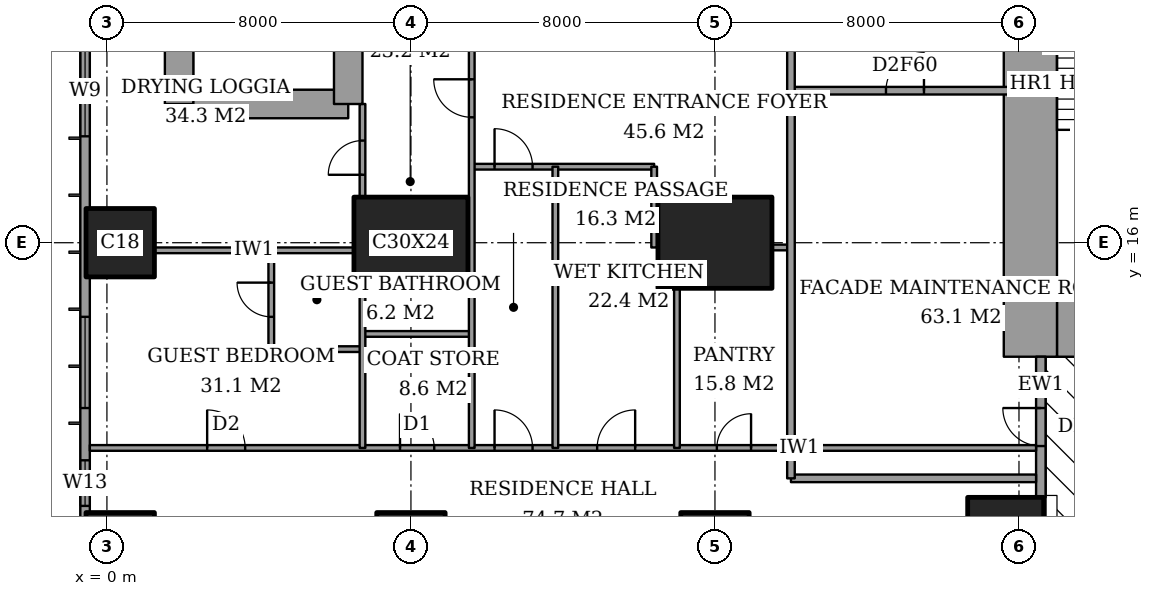
"""IFC4 building model, lengths in metres.
Left out: names, types, materials, properties, quantities, classifications, styles, units other than length and angle.
Written with IfcOpenShell. Run it as: python <this file> out.ifc"""

import sys

from ifc_helpers import new_model, si_unit, direction, frame, frame_2d, origin, origin_2d, place, context, subcontext, project, spatial, rectangle, extrude, element, fill, save


model = new_model("IFC4")
c1 = context("Model", 3, precision=1e-05, world=origin(), true_north=direction((0.0, 1.0)))
c2 = subcontext(c1, "Body", "Model", "MODEL_VIEW")
j1 = project(units=[si_unit("LENGTHUNIT", "METRE"), si_unit("PLANEANGLEUNIT", "RADIAN")], contexts=[c1])
p1 = place(None, origin())
s1 = spatial("IfcSite", under=j1, at=p1, CompositionType="ELEMENT")
p2 = place(p1, origin())
s2 = spatial("IfcBuilding", under=s1, at=p2, CompositionType="ELEMENT")
p3 = place(p2, frame((0.0, 0.0, 182.2)))
s3 = spatial("IfcBuildingStorey", under=s2, at=p3, CompositionType="ELEMENT", Elevation=182.2)
for number, where, z_axis, x_axis in (
    (1, (0.35, 8.0, 0.0), (0.0, 0.0, 1.0), (1.0, 0.0, 0.0)),
    (2, (0.35, 16.0, 0.0), (0.0, 0.0, 1.0), (1.0, 0.0, 0.0)),
    (3, (8.0, 8.0, 0.0), (0.0, 0.0, 1.0), (1.0, 0.0, 0.0)),
):
    element("IfcColumn", number, at=place(p3, frame(where, z_axis=z_axis, x_axis=x_axis)), inside=s3, PredefinedType="COLUMN", context=c2, shape_type="SweptSolid", body=[
        extrude(rectangle(XDim=1.8, YDim=1.8, at=origin_2d()), origin(), (0.0, 0.0, 1.0), 3.6),
    ])
p4 = place(p3, frame((8.0, 16.0, 0.0), z_axis=(0.0, 0.0, 1.0), x_axis=(1.0, 0.0, 0.0)))
e4 = element("IfcColumn", 4, at=p4, inside=s3, PredefinedType="COLUMN", context=c2, shape_type="SweptSolid", body=[
    extrude(rectangle(XDim=3.0, YDim=2.4, at=origin_2d()), origin(), (0.0, 0.0, 1.0), 3.6),
])
p5 = place(p3, frame((16.0, 8.0, 0.0), z_axis=(0.0, 0.0, 1.0), x_axis=(1.0, 0.0, 0.0)))
e5 = element("IfcColumn", 5, at=p5, inside=s3, PredefinedType="COLUMN", context=c2, shape_type="SweptSolid", body=[
    extrude(rectangle(XDim=1.8, YDim=1.8, at=origin_2d()), origin(), (0.0, 0.0, 1.0), 3.6),
])
p6 = place(p3, frame((16.0, 16.0, 0.0), z_axis=(0.0, 0.0, 1.0), x_axis=(1.0, 0.0, 0.0)))
e6 = element("IfcColumn", 6, at=p6, inside=s3, PredefinedType="COLUMN", context=c2, shape_type="SweptSolid", body=[
    extrude(rectangle(XDim=3.0, YDim=2.4, at=origin_2d()), origin(), (0.0, 0.0, 1.0), 3.6),
])
p7 = place(p3, frame((23.65, 8.0, 0.0), z_axis=(0.0, 0.0, 1.0), x_axis=(1.0, 0.0, 0.0)))
e7 = element("IfcColumn", 7, at=p7, inside=s3, PredefinedType="COLUMN", context=c2, shape_type="SweptSolid", body=[
    extrude(rectangle(XDim=2.0, YDim=2.6, at=origin_2d()), origin(), (0.0, 0.0, 1.0), 3.6),
])
p8 = place(p3, frame((25.0, 14.0, 0.0), z_axis=(0.0, 0.0, 1.0), x_axis=(1.0, 0.0, 0.0)))
e8 = element("IfcWall", 8, at=p8, inside=s3, PredefinedType="SHEAR", context=c2, shape_type="SweptSolid", body=[
    extrude(rectangle(XDim=3.15, YDim=2.0, at=frame_2d((1.575, 0.0))), origin(), (0.0, 0.0, 1.0), 3.6),
])
p9 = place(p3, frame((24.3, 13.0, 0.0), z_axis=(0.0, 0.0, 1.0), x_axis=(0.0, 1.0, 0.0)))
e9 = element("IfcWall", 9, at=p9, inside=s3, PredefinedType="SHEAR", context=c2, shape_type="SweptSolid", body=[
    extrude(rectangle(XDim=10.15, YDim=1.4, at=frame_2d((5.075, 0.0))), origin(), (0.0, 0.0, 1.0), 3.6),
])
p10 = place(p3, frame((1.9, 19.65, 0.0), z_axis=(0.0, 0.0, 1.0), x_axis=(1.0, 0.0, 0.0)))
e10 = element("IfcWall", 10, at=p10, inside=s3, PredefinedType="SHEAR", context=c2, shape_type="SweptSolid", body=[
    extrude(rectangle(XDim=4.45, YDim=0.75, at=frame_2d((2.225, 0.0))), origin(), (0.0, 0.0, 1.0), 3.6),
])
p11 = place(p3, frame((6.35, 19.65, 0.0), z_axis=(0.0, 0.0, 1.0), x_axis=(0.0, 1.0, 0.0)))
e11 = element("IfcWall", 11, at=p11, inside=s3, PredefinedType="SHEAR", context=c2, shape_type="SweptSolid", body=[
    extrude(rectangle(XDim=8.7, YDim=0.75, at=frame_2d((4.35, 0.0))), origin(), (0.0, 0.0, 1.0), 3.6),
])
p12 = place(p11, frame((6.725, 0.0, 0.0)))
e12 = element("IfcOpeningElement", 12, at=p12, cuts=e11, PredefinedType="OPENING", context=c2, shape_type="SweptSolid", body=[
    extrude(rectangle(XDim=1.0, YDim=2.1, at=frame_2d((0.5, 1.05))), frame((0.0, 0.385, 0.0), z_axis=(0.0, -1.0, 0.0), x_axis=(1.0, 0.0, 0.0)), (0.0, 0.0, 1.0), 0.77),
])
p13 = place(p3, frame((1.9, 28.35, 0.0), z_axis=(0.0, 0.0, 1.0), x_axis=(0.0, -1.0, 0.0)))
e13 = element("IfcWall", 13, at=p13, inside=s3, PredefinedType="SHEAR", context=c2, shape_type="SweptSolid", body=[
    extrude(rectangle(XDim=8.7, YDim=0.75, at=frame_2d((4.35, 0.0))), origin(), (0.0, 0.0, 1.0), 3.6),
])
p14 = place(p3, frame((24.575, 9.3, 0.0), z_axis=(0.0, 0.0, 1.0), x_axis=(0.0, 1.0, 0.0)))
e14 = element("IfcWall", 14, at=p14, inside=s3, PredefinedType="SOLIDWALL", context=c2, shape_type="SweptSolid", body=[
    extrude(rectangle(XDim=3.7, YDim=0.25, at=frame_2d((1.85, 0.0))), origin(), (0.0, 0.0, 1.0), 3.6),
])
p15 = place(p14, frame((1.35, 0.0, 0.0)))
e15 = element("IfcOpeningElement", 15, at=p15, cuts=e14, PredefinedType="OPENING", context=c2, shape_type="SweptSolid", body=[
    extrude(rectangle(XDim=1.0, YDim=2.1, at=frame_2d((0.5, 1.05))), frame((0.0, 0.135, 0.0), z_axis=(0.0, -1.0, 0.0), x_axis=(1.0, 0.0, 0.0)), (0.0, 0.0, 1.0), 0.27),
])
p16 = place(p3, frame((-0.575, 44.825, 0.0), z_axis=(0.0, 0.0, 1.0), x_axis=(0.0, -1.0, 0.0)))
e16 = element("IfcWall", 16, at=p16, inside=s3, PredefinedType="SOLIDWALL", context=c2, shape_type="SweptSolid", body=[
    extrude(rectangle(XDim=41.65, YDim=0.25, at=frame_2d((20.825, 0.0))), origin(), (0.0, 0.0, 1.0), 3.6),
])
p17 = place(p16, frame((0.825, 0.0, 0.2)))
e17 = element("IfcOpeningElement", 17, at=p17, cuts=e16, PredefinedType="OPENING", context=c2, shape_type="SweptSolid", body=[
    extrude(rectangle(XDim=2.4, YDim=2.4, at=frame_2d((1.2, 1.2))), frame((0.0, 0.135, 0.0), z_axis=(0.0, -1.0, 0.0), x_axis=(1.0, 0.0, 0.0)), (0.0, 0.0, 1.0), 0.27),
])
p18 = place(p16, frame((6.05, 0.0, 0.2)))
e18 = element("IfcOpeningElement", 18, at=p18, cuts=e16, PredefinedType="OPENING", context=c2, shape_type="SweptSolid", body=[
    extrude(rectangle(XDim=1.2, YDim=2.4, at=frame_2d((0.6, 1.2))), frame((0.0, 0.135, 0.0), z_axis=(0.0, -1.0, 0.0), x_axis=(1.0, 0.0, 0.0)), (0.0, 0.0, 1.0), 0.27),
])
p19 = place(p16, frame((8.475, 0.0, 0.2)))
e19 = element("IfcOpeningElement", 19, at=p19, cuts=e16, PredefinedType="OPENING", context=c2, shape_type="SweptSolid", body=[
    extrude(rectangle(XDim=2.4, YDim=2.4, at=frame_2d((1.2, 1.2))), frame((0.0, 0.135, 0.0), z_axis=(0.0, -1.0, 0.0), x_axis=(1.0, 0.0, 0.0)), (0.0, 0.0, 1.0), 0.27),
])
p20 = place(p16, frame((15.625, 0.0, 0.2)))
e20 = element("IfcOpeningElement", 20, at=p20, cuts=e16, PredefinedType="OPENING", context=c2, shape_type="SweptSolid", body=[
    extrude(rectangle(XDim=2.4, YDim=2.4, at=frame_2d((1.2, 1.2))), frame((0.0, 0.135, 0.0), z_axis=(0.0, -1.0, 0.0), x_axis=(1.0, 0.0, 0.0)), (0.0, 0.0, 1.0), 0.27),
])
p21 = place(p16, frame((23.625, 0.0, 0.2)))
e21 = element("IfcOpeningElement", 21, at=p21, cuts=e16, PredefinedType="OPENING", context=c2, shape_type="SweptSolid", body=[
    extrude(rectangle(XDim=2.4, YDim=2.4, at=frame_2d((1.2, 1.2))), frame((0.0, 0.135, 0.0), z_axis=(0.0, -1.0, 0.0), x_axis=(1.0, 0.0, 0.0)), (0.0, 0.0, 1.0), 0.27),
])
p22 = place(p16, frame((30.775, 0.0, 0.2)))
e22 = element("IfcOpeningElement", 22, at=p22, cuts=e16, PredefinedType="OPENING", context=c2, shape_type="SweptSolid", body=[
    extrude(rectangle(XDim=2.4, YDim=2.4, at=frame_2d((1.2, 1.2))), frame((0.0, 0.135, 0.0), z_axis=(0.0, -1.0, 0.0), x_axis=(1.0, 0.0, 0.0)), (0.0, 0.0, 1.0), 0.27),
])
p23 = place(p16, frame((34.55, 0.0, 0.2)))
e23 = element("IfcOpeningElement", 23, at=p23, cuts=e16, PredefinedType="OPENING", context=c2, shape_type="SweptSolid", body=[
    extrude(rectangle(XDim=1.2, YDim=2.4, at=frame_2d((0.6, 1.2))), frame((0.0, 0.135, 0.0), z_axis=(0.0, -1.0, 0.0), x_axis=(1.0, 0.0, 0.0)), (0.0, 0.0, 1.0), 0.27),
])
p24 = place(p16, frame((38.425, 0.0, 0.2)))
e24 = element("IfcOpeningElement", 24, at=p24, cuts=e16, PredefinedType="OPENING", context=c2, shape_type="SweptSolid", body=[
    extrude(rectangle(XDim=2.4, YDim=2.4, at=frame_2d((1.2, 1.2))), frame((0.0, 0.135, 0.0), z_axis=(0.0, -1.0, 0.0), x_axis=(1.0, 0.0, 0.0)), (0.0, 0.0, 1.0), 0.27),
])
p25 = place(p3, frame((18.0, 9.8, 0.0), z_axis=(0.0, 0.0, 1.0), x_axis=(1.0, 0.0, 0.0)))
e25 = element("IfcWall", 25, at=p25, inside=s3, PredefinedType="PARTITIONING", context=c2, shape_type="SweptSolid", body=[
    extrude(rectangle(XDim=6.45, YDim=0.2, at=frame_2d((3.225, 0.0))), origin(), (0.0, 0.0, 1.0), 3.35),
])
p26 = place(p3, frame((-0.45, 10.6, 0.0), z_axis=(0.0, 0.0, 1.0), x_axis=(1.0, 0.0, 0.0)))
e26 = element("IfcWall", 26, at=p26, inside=s3, PredefinedType="PARTITIONING", context=c2, shape_type="SweptSolid", body=[
    extrude(rectangle(XDim=24.9, YDim=0.15, at=frame_2d((12.45, 0.0))), origin(), (0.0, 0.0, 1.0), 3.35),
])
p27 = place(p26, frame((10.65, 0.0, 0.0)))
e27 = element("IfcOpeningElement", 27, at=p27, cuts=e26, PredefinedType="OPENING", context=c2, shape_type="SweptSolid", body=[
    extrude(rectangle(XDim=1.0, YDim=2.1, at=frame_2d((0.5, 1.05))), frame((0.0, 0.085, 0.0), z_axis=(0.0, -1.0, 0.0), x_axis=(1.0, 0.0, 0.0)), (0.0, 0.0, 1.0), 0.17),
])
p28 = place(p26, frame((3.087, 0.0, 0.0)))
e28 = element("IfcOpeningElement", 28, at=p28, cuts=e26, PredefinedType="OPENING", context=c2, shape_type="SweptSolid", body=[
    extrude(rectangle(XDim=1.0, YDim=2.1, at=frame_2d((0.5, 1.05))), frame((0.0, 0.085, 0.0), z_axis=(0.0, -1.0, 0.0), x_axis=(1.0, 0.0, 0.0)), (0.0, 0.0, 1.0), 0.17),
])
p29 = place(p26, frame((8.163, 0.0, 0.0)))
e29 = element("IfcOpeningElement", 29, at=p29, cuts=e26, PredefinedType="OPENING", context=c2, shape_type="SweptSolid", body=[
    extrude(rectangle(XDim=0.9, YDim=2.1, at=frame_2d((0.45, 1.05))), frame((0.0, 0.085, 0.0), z_axis=(0.0, -1.0, 0.0), x_axis=(1.0, 0.0, 0.0)), (0.0, 0.0, 1.0), 0.17),
])
p30 = place(p26, frame((13.35, 0.0, 0.0)))
e30 = element("IfcOpeningElement", 30, at=p30, cuts=e26, PredefinedType="OPENING", context=c2, shape_type="SweptSolid", body=[
    extrude(rectangle(XDim=1.0, YDim=2.1, at=frame_2d((0.5, 1.05))), frame((0.0, 0.085, 0.0), z_axis=(0.0, -1.0, 0.0), x_axis=(1.0, 0.0, 0.0)), (0.0, 0.0, 1.0), 0.17),
])
p31 = place(p26, frame((16.5, 0.0, 0.0)))
e31 = element("IfcOpeningElement", 31, at=p31, cuts=e26, PredefinedType="OPENING", context=c2, shape_type="SweptSolid", body=[
    extrude(rectangle(XDim=0.9, YDim=2.1, at=frame_2d((0.45, 1.05))), frame((0.0, 0.085, 0.0), z_axis=(0.0, -1.0, 0.0), x_axis=(1.0, 0.0, 0.0)), (0.0, 0.0, 1.0), 0.17),
])
p32 = place(p3, frame((4.325, 13.2, 0.0), z_axis=(0.0, 0.0, 1.0), x_axis=(1.0, 0.0, 0.0)))
e32 = element("IfcWall", 32, at=p32, inside=s3, PredefinedType="PARTITIONING", context=c2, shape_type="SweptSolid", body=[
    extrude(rectangle(XDim=2.4, YDim=0.15, at=frame_2d((1.2, 0.0))), origin(), (0.0, 0.0, 1.0), 3.35),
])
p33 = place(p3, frame((6.725, 13.6, 0.0), z_axis=(0.0, 0.0, 1.0), x_axis=(1.0, 0.0, 0.0)))
e33 = element("IfcWall", 33, at=p33, inside=s3, PredefinedType="PARTITIONING", context=c2, shape_type="SweptSolid", body=[
    extrude(rectangle(XDim=2.875, YDim=0.15, at=frame_2d((1.438, 0.0))), origin(), (0.0, 0.0, 1.0), 3.35),
])
p34 = place(p3, frame((1.25, 15.8, 0.0), z_axis=(0.0, 0.0, 1.0), x_axis=(1.0, 0.0, 0.0)))
e34 = element("IfcWall", 34, at=p34, inside=s3, PredefinedType="PARTITIONING", context=c2, shape_type="SweptSolid", body=[
    extrude(rectangle(XDim=5.25, YDim=0.15, at=frame_2d((2.625, 0.0))), origin(), (0.0, 0.0, 1.0), 3.35),
])
p35 = place(p3, frame((17.5, 15.875, 0.0), z_axis=(0.0, 0.0, 1.0), x_axis=(1.0, 0.0, 0.0)))
e35 = element("IfcWall", 35, at=p35, inside=s3, PredefinedType="PARTITIONING", context=c2, shape_type="SweptSolid", body=[
    extrude(rectangle(XDim=0.5, YDim=0.15, at=frame_2d((0.25, 0.0))), origin(), (0.0, 0.0, 1.0), 2.634),
])
p36 = place(p3, frame((9.6, 18.0, 0.0), z_axis=(0.0, 0.0, 1.0), x_axis=(1.0, 0.0, 0.0)))
e36 = element("IfcWall", 36, at=p36, inside=s3, PredefinedType="PARTITIONING", context=c2, shape_type="SweptSolid", body=[
    extrude(rectangle(XDim=4.8, YDim=0.15, at=frame_2d((2.4, 0.0))), origin(), (0.0, 0.0, 1.0), 3.35),
])
p37 = place(p36, frame((0.6, 0.0, 0.0)))
e37 = element("IfcOpeningElement", 37, at=p37, cuts=e36, PredefinedType="OPENING", context=c2, shape_type="SweptSolid", body=[
    extrude(rectangle(XDim=1.0, YDim=2.1, at=frame_2d((0.5, 1.05))), frame((0.0, 0.085, 0.0), z_axis=(0.0, -1.0, 0.0), x_axis=(1.0, 0.0, 0.0)), (0.0, 0.0, 1.0), 0.17),
])
p38 = place(p3, frame((18.0, 20.0, 0.0), z_axis=(0.0, 0.0, 1.0), x_axis=(1.0, 0.0, 0.0)))
e38 = element("IfcWall", 38, at=p38, inside=s3, PredefinedType="PARTITIONING", context=c2, shape_type="SweptSolid", body=[
    extrude(rectangle(XDim=6.0, YDim=0.2, at=frame_2d((3.0, 0.0))), origin(), (0.0, 0.0, 1.0), 3.35),
])
p39 = place(p38, frame((2.5, 0.0, 0.0)))
e39 = element("IfcOpeningElement", 39, at=p39, cuts=e38, PredefinedType="OPENING", context=c2, shape_type="SweptSolid", body=[
    extrude(rectangle(XDim=1.0, YDim=2.1, at=frame_2d((0.5, 1.05))), frame((0.0, 0.11, 0.0), z_axis=(0.0, -1.0, 0.0), x_axis=(1.0, 0.0, 0.0)), (0.0, 0.0, 1.0), 0.22),
])
p40 = place(p3, frame((4.325, 13.2, 0.0), z_axis=(0.0, 0.0, 1.0), x_axis=(0.0, 1.0, 0.0)))
e40 = element("IfcWall", 40, at=p40, inside=s3, PredefinedType="PARTITIONING", context=c2, shape_type="SweptSolid", body=[
    extrude(rectangle(XDim=2.6, YDim=0.15, at=frame_2d((1.3, 0.0))), origin(), (0.0, 0.0, 1.0), 3.35),
])
p41 = place(p40, frame((0.85, 0.0, 0.0)))
e41 = element("IfcOpeningElement", 41, at=p41, cuts=e40, PredefinedType="OPENING", context=c2, shape_type="SweptSolid", body=[
    extrude(rectangle(XDim=0.9, YDim=2.1, at=frame_2d((0.45, 1.05))), frame((0.0, 0.085, 0.0), z_axis=(0.0, -1.0, 0.0), x_axis=(1.0, 0.0, 0.0)), (0.0, 0.0, 1.0), 0.17),
])
p42 = place(p3, frame((6.725, 10.6, 0.0), z_axis=(0.0, 0.0, 1.0), x_axis=(0.0, 1.0, 0.0)))
e42 = element("IfcWall", 42, at=p42, inside=s3, PredefinedType="PARTITIONING", context=c2, shape_type="SweptSolid", body=[
    extrude(rectangle(XDim=4.2, YDim=0.15, at=frame_2d((2.1, 0.0))), origin(), (0.0, 0.0, 1.0), 3.35),
])
p43 = place(p3, frame((6.725, 17.2, 0.0), z_axis=(0.0, 0.0, 1.0), x_axis=(0.0, 1.0, 0.0)))
e43 = element("IfcWall", 43, at=p43, inside=s3, PredefinedType="PARTITIONING", context=c2, shape_type="SweptSolid", body=[
    extrude(rectangle(XDim=2.45, YDim=0.15, at=frame_2d((1.225, 0.0))), origin(), (0.0, 0.0, 1.0), 3.35),
])
p44 = place(p43, frame((0.587, 0.0, 0.0)))
e44 = element("IfcOpeningElement", 44, at=p44, cuts=e43, PredefinedType="OPENING", context=c2, shape_type="SweptSolid", body=[
    extrude(rectangle(XDim=0.9, YDim=2.1, at=frame_2d((0.45, 1.05))), frame((0.0, 0.085, 0.0), z_axis=(0.0, -1.0, 0.0), x_axis=(1.0, 0.0, 0.0)), (0.0, 0.0, 1.0), 0.17),
])
p45 = place(p3, frame((9.6, 10.6, 0.0), z_axis=(0.0, 0.0, 1.0), x_axis=(0.0, 1.0, 0.0)))
e45 = element("IfcWall", 45, at=p45, inside=s3, PredefinedType="PARTITIONING", context=c2, shape_type="SweptSolid", body=[
    extrude(rectangle(XDim=11.0, YDim=0.15, at=frame_2d((5.5, 0.0))), origin(), (0.0, 0.0, 1.0), 3.35),
])
p46 = place(p45, frame((8.7, 0.0, 0.0)))
e46 = element("IfcOpeningElement", 46, at=p46, cuts=e45, PredefinedType="OPENING", context=c2, shape_type="SweptSolid", body=[
    extrude(rectangle(XDim=1.0, YDim=2.1, at=frame_2d((0.5, 1.05))), frame((0.0, 0.085, 0.0), z_axis=(0.0, -1.0, 0.0), x_axis=(1.0, 0.0, 0.0)), (0.0, 0.0, 1.0), 0.17),
])
p47 = place(p3, frame((11.8, 10.6, 0.0), z_axis=(0.0, 0.0, 1.0), x_axis=(0.0, 1.0, 0.0)))
e47 = element("IfcWall", 47, at=p47, inside=s3, PredefinedType="PARTITIONING", context=c2, shape_type="SweptSolid", body=[
    extrude(rectangle(XDim=7.4, YDim=0.15, at=frame_2d((3.7, 0.0))), origin(), (0.0, 0.0, 1.0), 3.35),
])
p48 = place(p3, frame((14.4, 15.875, 0.0), z_axis=(0.0, 0.0, 1.0), x_axis=(0.0, 1.0, 0.0)))
e48 = element("IfcWall", 48, at=p48, inside=s3, PredefinedType="PARTITIONING", context=c2, shape_type="SweptSolid", body=[
    extrude(rectangle(XDim=2.125, YDim=0.15, at=frame_2d((1.062, 0.0))), origin(), (0.0, 0.0, 1.0), 3.35),
])
p49 = place(p3, frame((15.0, 10.6, 0.0), z_axis=(0.0, 0.0, 1.0), x_axis=(0.0, 1.0, 0.0)))
e49 = element("IfcWall", 49, at=p49, inside=s3, PredefinedType="PARTITIONING", context=c2, shape_type="SweptSolid", body=[
    extrude(rectangle(XDim=4.2, YDim=0.15, at=frame_2d((2.1, 0.0))), origin(), (0.0, 0.0, 1.0), 3.35),
])
p50 = place(p3, frame((18.0, 9.8, 0.0), z_axis=(0.0, 0.0, 1.0), x_axis=(0.0, 1.0, 0.0)))
e50 = element("IfcWall", 50, at=p50, inside=s3, PredefinedType="PARTITIONING", context=c2, shape_type="SweptSolid", body=[
    extrude(rectangle(XDim=14.2, YDim=0.2, at=frame_2d((7.1, 0.0))), origin(), (0.0, 0.0, 1.0), 3.35),
])
p51 = place(p50, frame((11.6, 0.0, 0.0)))
e51 = element("IfcOpeningElement", 51, at=p51, cuts=e50, PredefinedType="OPENING", context=c2, shape_type="SweptSolid", body=[
    extrude(rectangle(XDim=1.2, YDim=2.4, at=frame_2d((0.6, 1.2))), frame((0.0, 0.11, 0.0), z_axis=(0.0, -1.0, 0.0), x_axis=(1.0, 0.0, 0.0)), (0.0, 0.0, 1.0), 0.22),
])
p52 = place(p15, origin())
e52 = element("IfcDoor", 52, at=p52, inside=s3, OperationType="SINGLE_SWING_LEFT", PredefinedType="DOOR", context=c2, shape_type="SweptSolid", body=[
    extrude(rectangle(XDim=1.0, YDim=2.1, at=frame_2d((0.5, 1.05))), frame((0.0, 0.025, 0.0), z_axis=(0.0, -1.0, 0.0), x_axis=(1.0, 0.0, 0.0)), (0.0, 0.0, 1.0), 0.05),
])
fill(e15, e52)
p53 = place(p21, origin())
e53 = element("IfcWindow", 53, at=p53, inside=s3, PartitioningType="SINGLE_PANEL", PredefinedType="WINDOW", context=c2, shape_type="SweptSolid", body=[
    extrude(rectangle(XDim=2.4, YDim=2.4, at=frame_2d((1.2, 1.2))), frame((0.0, 0.03, 0.0), z_axis=(0.0, -1.0, 0.0), x_axis=(1.0, 0.0, 0.0)), (0.0, 0.0, 1.0), 0.06),
])
fill(e21, e53)
p54 = place(p22, origin())
e54 = element("IfcWindow", 54, at=p54, inside=s3, PartitioningType="SINGLE_PANEL", PredefinedType="WINDOW", context=c2, shape_type="SweptSolid", body=[
    extrude(rectangle(XDim=2.4, YDim=2.4, at=frame_2d((1.2, 1.2))), frame((0.0, 0.03, 0.0), z_axis=(0.0, -1.0, 0.0), x_axis=(1.0, 0.0, 0.0)), (0.0, 0.0, 1.0), 0.06),
])
fill(e22, e54)
p55 = place(p23, origin())
e55 = element("IfcWindow", 55, at=p55, inside=s3, PartitioningType="SINGLE_PANEL", PredefinedType="WINDOW", context=c2, shape_type="SweptSolid", body=[
    extrude(rectangle(XDim=1.2, YDim=2.4, at=frame_2d((0.6, 1.2))), frame((0.0, 0.03, 0.0), z_axis=(0.0, -1.0, 0.0), x_axis=(1.0, 0.0, 0.0)), (0.0, 0.0, 1.0), 0.06),
])
fill(e23, e55)
p56 = place(p27, origin())
e56 = element("IfcDoor", 56, at=p56, inside=s3, OperationType="SINGLE_SWING_RIGHT", PredefinedType="DOOR", context=c2, shape_type="SweptSolid", body=[
    extrude(rectangle(XDim=1.0, YDim=2.1, at=frame_2d((0.5, 1.05))), frame((0.0, 0.025, 0.0), z_axis=(0.0, -1.0, 0.0), x_axis=(1.0, 0.0, 0.0)), (0.0, 0.0, 1.0), 0.05),
])
fill(e27, e56)
p57 = place(p41, origin())
e57 = element("IfcDoor", 57, at=p57, inside=s3, OperationType="SINGLE_SWING_LEFT", PredefinedType="DOOR", context=c2, shape_type="SweptSolid", body=[
    extrude(rectangle(XDim=0.9, YDim=2.1, at=frame_2d((0.45, 1.05))), frame((0.0, 0.025, 0.0), z_axis=(0.0, -1.0, 0.0), x_axis=(1.0, 0.0, 0.0)), (0.0, 0.0, 1.0), 0.05),
])
fill(e41, e57)
p58 = place(p28, origin())
e58 = element("IfcDoor", 58, at=p58, inside=s3, OperationType="SINGLE_SWING_RIGHT", PredefinedType="DOOR", context=c2, shape_type="SweptSolid", body=[
    extrude(rectangle(XDim=1.0, YDim=2.1, at=frame_2d((0.5, 1.05))), frame((0.0, 0.025, 0.0), z_axis=(0.0, -1.0, 0.0), x_axis=(1.0, 0.0, 0.0)), (0.0, 0.0, 1.0), 0.05),
])
fill(e28, e58)
p59 = place(p44, origin())
e59 = element("IfcDoor", 59, at=p59, inside=s3, OperationType="SINGLE_SWING_RIGHT", PredefinedType="DOOR", context=c2, shape_type="SweptSolid", body=[
    extrude(rectangle(XDim=0.9, YDim=2.1, at=frame_2d((0.45, 1.05))), frame((0.0, 0.025, 0.0), z_axis=(0.0, -1.0, 0.0), x_axis=(1.0, 0.0, 0.0)), (0.0, 0.0, 1.0), 0.05),
])
fill(e44, e59)
p60 = place(p29, origin())
e60 = element("IfcDoor", 60, at=p60, inside=s3, OperationType="SINGLE_SWING_RIGHT", PredefinedType="DOOR", context=c2, shape_type="SweptSolid", body=[
    extrude(rectangle(XDim=0.9, YDim=2.1, at=frame_2d((0.45, 1.05))), frame((0.0, 0.025, 0.0), z_axis=(0.0, -1.0, 0.0), x_axis=(1.0, 0.0, 0.0)), (0.0, 0.0, 1.0), 0.05),
])
fill(e29, e60)
p61 = place(p46, origin())
e61 = element("IfcDoor", 61, at=p61, inside=s3, OperationType="SINGLE_SWING_LEFT", PredefinedType="DOOR", context=c2, shape_type="SweptSolid", body=[
    extrude(rectangle(XDim=1.0, YDim=2.1, at=frame_2d((0.5, 1.05))), frame((0.0, 0.025, 0.0), z_axis=(0.0, -1.0, 0.0), x_axis=(1.0, 0.0, 0.0)), (0.0, 0.0, 1.0), 0.05),
])
fill(e46, e61)
p62 = place(p37, origin())
e62 = element("IfcDoor", 62, at=p62, inside=s3, OperationType="SINGLE_SWING_RIGHT", PredefinedType="DOOR", context=c2, shape_type="SweptSolid", body=[
    extrude(rectangle(XDim=1.0, YDim=2.1, at=frame_2d((0.5, 1.05))), frame((0.0, 0.025, 0.0), z_axis=(0.0, -1.0, 0.0), x_axis=(1.0, 0.0, 0.0)), (0.0, 0.0, 1.0), 0.05),
])
fill(e37, e62)
p63 = place(p30, origin())
e63 = element("IfcDoor", 63, at=p63, inside=s3, OperationType="SINGLE_SWING_LEFT", PredefinedType="DOOR", context=c2, shape_type="SweptSolid", body=[
    extrude(rectangle(XDim=1.0, YDim=2.1, at=frame_2d((0.5, 1.05))), frame((0.0, 0.025, 0.0), z_axis=(0.0, -1.0, 0.0), x_axis=(1.0, 0.0, 0.0)), (0.0, 0.0, 1.0), 0.05),
])
fill(e30, e63)
p64 = place(p31, origin())
e64 = element("IfcDoor", 64, at=p64, inside=s3, OperationType="SINGLE_SWING_LEFT", PredefinedType="DOOR", context=c2, shape_type="SweptSolid", body=[
    extrude(rectangle(XDim=0.9, YDim=2.1, at=frame_2d((0.45, 1.05))), frame((0.0, 0.025, 0.0), z_axis=(0.0, -1.0, 0.0), x_axis=(1.0, 0.0, 0.0)), (0.0, 0.0, 1.0), 0.05),
])
fill(e31, e64)
p65 = place(p39, origin())
e65 = element("IfcDoor", 65, at=p65, inside=s3, OperationType="SINGLE_SWING_LEFT", PredefinedType="DOOR", context=c2, shape_type="SweptSolid", body=[
    extrude(rectangle(XDim=1.0, YDim=2.1, at=frame_2d((0.5, 1.05))), frame((0.0, 0.025, 0.0), z_axis=(0.0, -1.0, 0.0), x_axis=(1.0, 0.0, 0.0)), (0.0, 0.0, 1.0), 0.05),
])
fill(e39, e65)
save(model, sys.argv[1])
